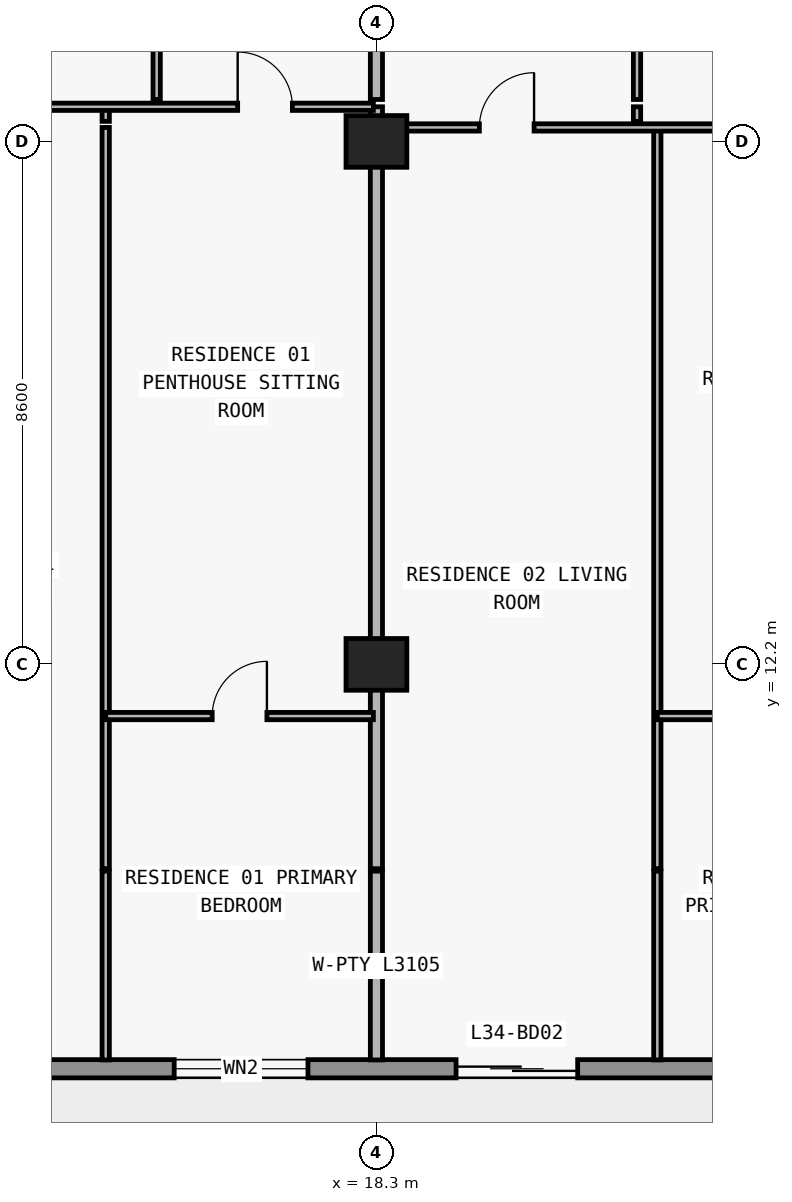
"""IFC4 building model, lengths in metres.
Left out: names, types, materials, properties, quantities, classifications, styles, units other than length and angle.
Written with IfcOpenShell. Run it as: python <this file> out.ifc"""

import sys

from ifc_helpers import new_model, si_unit, direction, frame, frame_2d, origin, origin_2d, place, context, subcontext, project, spatial, rectangle, extrude, element, fill, save


model = new_model("IFC4")
c1 = context("Model", 3, precision=1e-05, world=origin(), true_north=direction((0.0, 1.0)))
c2 = subcontext(c1, "Body", "Model", "MODEL_VIEW")
j1 = project(units=[si_unit("LENGTHUNIT", "METRE"), si_unit("PLANEANGLEUNIT", "RADIAN")], contexts=[c1])
p1 = place(None, origin())
s1 = spatial("IfcSite", under=j1, at=p1, CompositionType="ELEMENT")
p2 = place(p1, origin())
s2 = spatial("IfcBuilding", under=s1, at=p2, CompositionType="ELEMENT")
p3 = place(p2, frame((0.0, 0.0, 125.7)))
s3 = spatial("IfcBuildingStorey", under=s2, at=p3, CompositionType="ELEMENT", Elevation=125.7)
for number, where, z_axis, x_axis in (
    (1, (18.3, 12.2, 0.0), (0.0, 0.0, 1.0), (1.0, 0.0, 0.0)),
    (2, (18.3, 20.8, 0.0), (0.0, 0.0, 1.0), (1.0, 0.0, 0.0)),
):
    element("IfcColumn", number, at=place(p3, frame(where, z_axis=z_axis, x_axis=x_axis)), inside=s3, PredefinedType="COLUMN", context=c2, shape_type="SweptSolid", body=[
        extrude(rectangle(XDim=1.0, YDim=0.85, at=origin_2d()), origin(), (0.0, 0.0, 1.0), 3.05),
    ])
p4 = place(p3, frame((70.1, 5.55, 0.0), z_axis=(0.0, 0.0, 1.0), x_axis=(-1.0, 0.0, 0.0)))
e3 = element("IfcWall", 3, at=p4, inside=s3, PredefinedType="STANDARD", context=c2, shape_type="SweptSolid", body=[
    extrude(rectangle(XDim=62.4, YDim=0.3, at=frame_2d((31.2, 0.0))), origin(), (0.0, 0.0, 1.0), 3.05),
])
p5 = place(p4, frame((57.226, 0.0, 0.0)))
e4 = element("IfcOpeningElement", 4, at=p5, cuts=e3, PredefinedType="OPENING", context=c2, shape_type="SweptSolid", body=[
    extrude(rectangle(XDim=2.0, YDim=2.3, at=frame_2d((1.0, 1.15))), frame((0.0, 0.16, 0.0), z_axis=(0.0, -1.0, 0.0), x_axis=(1.0, 0.0, 0.0)), (0.0, 0.0, 1.0), 0.32),
])
p6 = place(p4, frame((52.926, 0.0, 0.85)))
e5 = element("IfcOpeningElement", 5, at=p6, cuts=e3, PredefinedType="OPENING", context=c2, shape_type="SweptSolid", body=[
    extrude(rectangle(XDim=2.2, YDim=1.55, at=frame_2d((1.1, 0.775))), frame((0.0, 0.16, 0.0), z_axis=(0.0, -1.0, 0.0), x_axis=(1.0, 0.0, 0.0)), (0.0, 0.0, 1.0), 0.32),
])
p7 = place(p4, frame((48.49, 0.0, 0.0)))
e6 = element("IfcOpeningElement", 6, at=p7, cuts=e3, PredefinedType="OPENING", context=c2, shape_type="SweptSolid", body=[
    extrude(rectangle(XDim=2.0, YDim=2.3, at=frame_2d((1.0, 1.15))), frame((0.0, 0.16, 0.0), z_axis=(0.0, -1.0, 0.0), x_axis=(1.0, 0.0, 0.0)), (0.0, 0.0, 1.0), 0.32),
])
p8 = place(p4, frame((44.39, 0.0, 0.85)))
e7 = element("IfcOpeningElement", 7, at=p8, cuts=e3, PredefinedType="OPENING", context=c2, shape_type="SweptSolid", body=[
    extrude(rectangle(XDim=1.8, YDim=1.55, at=frame_2d((0.9, 0.775))), frame((0.0, 0.16, 0.0), z_axis=(0.0, -1.0, 0.0), x_axis=(1.0, 0.0, 0.0)), (0.0, 0.0, 1.0), 0.32),
])
p9 = place(p4, frame((40.426, 0.0, 0.0)))
e8 = element("IfcOpeningElement", 8, at=p9, cuts=e3, PredefinedType="OPENING", context=c2, shape_type="SweptSolid", body=[
    extrude(rectangle(XDim=2.0, YDim=2.3, at=frame_2d((1.0, 1.15))), frame((0.0, 0.16, 0.0), z_axis=(0.0, -1.0, 0.0), x_axis=(1.0, 0.0, 0.0)), (0.0, 0.0, 1.0), 0.32),
])
p10 = place(p4, frame((36.126, 0.0, 0.85)))
e9 = element("IfcOpeningElement", 9, at=p10, cuts=e3, PredefinedType="OPENING", context=c2, shape_type="SweptSolid", body=[
    extrude(rectangle(XDim=2.2, YDim=1.55, at=frame_2d((1.1, 0.775))), frame((0.0, 0.16, 0.0), z_axis=(0.0, -1.0, 0.0), x_axis=(1.0, 0.0, 0.0)), (0.0, 0.0, 1.0), 0.32),
])
p11 = place(p4, frame((31.91, 0.0, 0.0)))
e10 = element("IfcOpeningElement", 10, at=p11, cuts=e3, PredefinedType="OPENING", context=c2, shape_type="SweptSolid", body=[
    extrude(rectangle(XDim=2.0, YDim=2.3, at=frame_2d((1.0, 1.15))), frame((0.0, 0.16, 0.0), z_axis=(0.0, -1.0, 0.0), x_axis=(1.0, 0.0, 0.0)), (0.0, 0.0, 1.0), 0.32),
])
p12 = place(p4, frame((28.21, 0.0, 0.85)))
e11 = element("IfcOpeningElement", 11, at=p12, cuts=e3, PredefinedType="OPENING", context=c2, shape_type="SweptSolid", body=[
    extrude(rectangle(XDim=1.8, YDim=1.55, at=frame_2d((0.9, 0.775))), frame((0.0, 0.16, 0.0), z_axis=(0.0, -1.0, 0.0), x_axis=(1.0, 0.0, 0.0)), (0.0, 0.0, 1.0), 0.32),
])
p13 = place(p4, frame((24.426, 0.0, 0.0)))
e12 = element("IfcOpeningElement", 12, at=p13, cuts=e3, PredefinedType="OPENING", context=c2, shape_type="SweptSolid", body=[
    extrude(rectangle(XDim=2.0, YDim=2.3, at=frame_2d((1.0, 1.15))), frame((0.0, 0.16, 0.0), z_axis=(0.0, -1.0, 0.0), x_axis=(1.0, 0.0, 0.0)), (0.0, 0.0, 1.0), 0.32),
])
p14 = place(p4, frame((20.126, 0.0, 0.85)))
e13 = element("IfcOpeningElement", 13, at=p14, cuts=e3, PredefinedType="OPENING", context=c2, shape_type="SweptSolid", body=[
    extrude(rectangle(XDim=2.2, YDim=1.55, at=frame_2d((1.1, 0.775))), frame((0.0, 0.16, 0.0), z_axis=(0.0, -1.0, 0.0), x_axis=(1.0, 0.0, 0.0)), (0.0, 0.0, 1.0), 0.32),
])
p15 = place(p4, frame((15.69, 0.0, 0.0)))
e14 = element("IfcOpeningElement", 14, at=p15, cuts=e3, PredefinedType="OPENING", context=c2, shape_type="SweptSolid", body=[
    extrude(rectangle(XDim=2.0, YDim=2.3, at=frame_2d((1.0, 1.15))), frame((0.0, 0.16, 0.0), z_axis=(0.0, -1.0, 0.0), x_axis=(1.0, 0.0, 0.0)), (0.0, 0.0, 1.0), 0.32),
])
p16 = place(p4, frame((11.59, 0.0, 0.85)))
e15 = element("IfcOpeningElement", 15, at=p16, cuts=e3, PredefinedType="OPENING", context=c2, shape_type="SweptSolid", body=[
    extrude(rectangle(XDim=1.8, YDim=1.55, at=frame_2d((0.9, 0.775))), frame((0.0, 0.16, 0.0), z_axis=(0.0, -1.0, 0.0), x_axis=(1.0, 0.0, 0.0)), (0.0, 0.0, 1.0), 0.32),
])
p17 = place(p4, frame((7.626, 0.0, 0.0)))
e16 = element("IfcOpeningElement", 16, at=p17, cuts=e3, PredefinedType="OPENING", context=c2, shape_type="SweptSolid", body=[
    extrude(rectangle(XDim=2.0, YDim=2.3, at=frame_2d((1.0, 1.15))), frame((0.0, 0.16, 0.0), z_axis=(0.0, -1.0, 0.0), x_axis=(1.0, 0.0, 0.0)), (0.0, 0.0, 1.0), 0.32),
])
p18 = place(p4, frame((3.326, 0.0, 0.85)))
e17 = element("IfcOpeningElement", 17, at=p18, cuts=e3, PredefinedType="OPENING", context=c2, shape_type="SweptSolid", body=[
    extrude(rectangle(XDim=2.2, YDim=1.55, at=frame_2d((1.1, 0.775))), frame((0.0, 0.16, 0.0), z_axis=(0.0, -1.0, 0.0), x_axis=(1.0, 0.0, 0.0)), (0.0, 0.0, 1.0), 0.32),
])
p19 = place(p3, frame((13.848, 5.695, 0.0), z_axis=(0.0, 0.0, 1.0), x_axis=(0.0, 1.0, 0.0)))
e18 = element("IfcWall", 18, at=p19, inside=s3, PredefinedType="PARTITIONING", context=c2, shape_type="SweptSolid", body=[
    extrude(rectangle(XDim=3.105, YDim=0.12, at=frame_2d((1.552, 0.0))), origin(), (0.0, 0.0, 1.0), 3.05),
])
p20 = place(p3, frame((13.848, 8.84, 0.0), z_axis=(0.0, 0.0, 1.0), x_axis=(0.0, 1.0, 0.0)))
e19 = element("IfcWall", 19, at=p20, inside=s3, PredefinedType="PARTITIONING", context=c2, shape_type="SweptSolid", body=[
    extrude(rectangle(XDim=12.19, YDim=0.12, at=frame_2d((6.095, 0.0))), origin(), (0.0, 0.0, 1.0), 3.05),
])
p21 = place(p3, frame((13.848, 21.13, 0.0), z_axis=(0.0, 0.0, 1.0), x_axis=(0.0, 1.0, 0.0)))
e20 = element("IfcWall", 20, at=p21, inside=s3, PredefinedType="PARTITIONING", context=c2, shape_type="SweptSolid", body=[
    extrude(rectangle(XDim=0.24, YDim=0.12, at=frame_2d((0.12, 0.0))), origin(), (0.0, 0.0, 1.0), 3.05),
])
p22 = place(p3, frame((14.686, 21.49, 0.0), z_axis=(0.0, 0.0, 1.0), x_axis=(0.0, 1.0, 0.0)))
e21 = element("IfcWall", 21, at=p22, inside=s3, PredefinedType="PARTITIONING", context=c2, shape_type="SweptSolid", body=[
    extrude(rectangle(XDim=4.69, YDim=0.12, at=frame_2d((2.345, 0.0))), origin(), (0.0, 0.0, 1.0), 3.05),
])
p23 = place(p22, frame((1.895, 0.0, 0.0)))
e22 = element("IfcOpeningElement", 22, at=p23, cuts=e21, PredefinedType="OPENING", context=c2, shape_type="SweptSolid", body=[
    extrude(rectangle(XDim=0.9, YDim=2.15, at=frame_2d((0.45, 1.075))), frame((0.0, 0.07, 0.0), z_axis=(0.0, -1.0, 0.0), x_axis=(1.0, 0.0, 0.0)), (0.0, 0.0, 1.0), 0.14),
])
p24 = place(p3, frame((18.3, 5.695, 0.0), z_axis=(0.0, 0.0, 1.0), x_axis=(0.0, 1.0, 0.0)))
e23 = element("IfcWall", 23, at=p24, inside=s3, PredefinedType="PARTITIONING", context=c2, shape_type="SweptSolid", body=[
    extrude(rectangle(XDim=3.105, YDim=0.2, at=frame_2d((1.552, 0.0))), origin(), (0.0, 0.0, 1.0), 3.05),
])
p25 = place(p3, frame((18.3, 8.84, 0.0), z_axis=(0.0, 0.0, 1.0), x_axis=(0.0, 1.0, 0.0)))
e24 = element("IfcWall", 24, at=p25, inside=s3, PredefinedType="PARTITIONING", context=c2, shape_type="SweptSolid", body=[
    extrude(rectangle(XDim=12.19, YDim=0.2, at=frame_2d((6.095, 0.0))), origin(), (0.0, 0.0, 1.0), 2.174),
])
p26 = place(p3, frame((18.3, 21.13, 0.0), z_axis=(0.0, 0.0, 1.0), x_axis=(0.0, 1.0, 0.0)))
e25 = element("IfcWall", 25, at=p26, inside=s3, PredefinedType="PARTITIONING", context=c2, shape_type="SweptSolid", body=[
    extrude(rectangle(XDim=0.24, YDim=0.2, at=frame_2d((0.12, 0.0))), origin(), (0.0, 0.0, 1.0), 2.174),
])
p27 = place(p3, frame((18.3, 21.49, 0.0), z_axis=(0.0, 0.0, 1.0), x_axis=(0.0, 1.0, 0.0)))
e26 = element("IfcWall", 26, at=p27, inside=s3, PredefinedType="PARTITIONING", context=c2, shape_type="SweptSolid", body=[
    extrude(rectangle(XDim=4.69, YDim=0.2, at=frame_2d((2.345, 0.0))), origin(), (0.0, 0.0, 1.0), 2.174),
])
p28 = place(p3, frame((22.586, 21.13, 0.0), z_axis=(0.0, 0.0, 1.0), x_axis=(0.0, 1.0, 0.0)))
e27 = element("IfcWall", 27, at=p28, inside=s3, PredefinedType="PARTITIONING", context=c2, shape_type="SweptSolid", body=[
    extrude(rectangle(XDim=0.24, YDim=0.12, at=frame_2d((0.12, 0.0))), origin(), (0.0, 0.0, 1.0), 3.05),
])
p29 = place(p3, frame((22.586, 21.49, 0.0), z_axis=(0.0, 0.0, 1.0), x_axis=(0.0, 1.0, 0.0)))
e28 = element("IfcWall", 28, at=p29, inside=s3, PredefinedType="PARTITIONING", context=c2, shape_type="SweptSolid", body=[
    extrude(rectangle(XDim=4.69, YDim=0.12, at=frame_2d((2.345, 0.0))), origin(), (0.0, 0.0, 1.0), 3.05),
])
p30 = place(p29, frame((1.895, 0.0, 0.0)))
e29 = element("IfcOpeningElement", 29, at=p30, cuts=e28, PredefinedType="OPENING", context=c2, shape_type="SweptSolid", body=[
    extrude(rectangle(XDim=0.9, YDim=2.15, at=frame_2d((0.45, 1.075))), frame((0.0, 0.07, 0.0), z_axis=(0.0, -1.0, 0.0), x_axis=(1.0, 0.0, 0.0)), (0.0, 0.0, 1.0), 0.14),
])
p31 = place(p3, frame((22.92, 5.695, 0.0), z_axis=(0.0, 0.0, 1.0), x_axis=(0.0, 1.0, 0.0)))
e30 = element("IfcWall", 30, at=p31, inside=s3, PredefinedType="PARTITIONING", context=c2, shape_type="SweptSolid", body=[
    extrude(rectangle(XDim=3.105, YDim=0.12, at=frame_2d((1.552, 0.0))), origin(), (0.0, 0.0, 1.0), 3.05),
])
p32 = place(p3, frame((22.92, 8.84, 0.0), z_axis=(0.0, 0.0, 1.0), x_axis=(0.0, 1.0, 0.0)))
e31 = element("IfcWall", 31, at=p32, inside=s3, PredefinedType="PARTITIONING", context=c2, shape_type="SweptSolid", body=[
    extrude(rectangle(XDim=12.19, YDim=0.12, at=frame_2d((6.095, 0.0))), origin(), (0.0, 0.0, 1.0), 3.05),
])
p33 = place(p3, frame((13.848, 11.35, 0.0), z_axis=(0.0, 0.0, 1.0), x_axis=(1.0, 0.0, 0.0)))
e32 = element("IfcWall", 32, at=p33, inside=s3, PredefinedType="PARTITIONING", context=c2, shape_type="SweptSolid", body=[
    extrude(rectangle(XDim=4.402, YDim=0.12, at=frame_2d((2.201, 0.0))), origin(), (0.0, 0.0, 1.0), 3.05),
])
p34 = place(p33, frame((1.751, 0.0, 0.0)))
e33 = element("IfcOpeningElement", 33, at=p34, cuts=e32, PredefinedType="OPENING", context=c2, shape_type="SweptSolid", body=[
    extrude(rectangle(XDim=0.9, YDim=2.15, at=frame_2d((0.45, 1.075))), frame((0.0, 0.07, 0.0), z_axis=(0.0, -1.0, 0.0), x_axis=(1.0, 0.0, 0.0)), (0.0, 0.0, 1.0), 0.14),
])
p35 = place(p3, frame((22.92, 11.35, 0.0), z_axis=(0.0, 0.0, 1.0), x_axis=(1.0, 0.0, 0.0)))
e34 = element("IfcWall", 34, at=p35, inside=s3, PredefinedType="PARTITIONING", context=c2, shape_type="SweptSolid", body=[
    extrude(rectangle(XDim=3.73, YDim=0.12, at=frame_2d((1.865, 0.0))), origin(), (0.0, 0.0, 1.0), 3.05),
])
p36 = place(p35, frame((1.415, 0.0, 0.0)))
e35 = element("IfcOpeningElement", 35, at=p36, cuts=e34, PredefinedType="OPENING", context=c2, shape_type="SweptSolid", body=[
    extrude(rectangle(XDim=0.9, YDim=2.15, at=frame_2d((0.45, 1.075))), frame((0.0, 0.07, 0.0), z_axis=(0.0, -1.0, 0.0), x_axis=(1.0, 0.0, 0.0)), (0.0, 0.0, 1.0), 0.14),
])
p37 = place(p3, frame((18.3, 21.03, 0.0), z_axis=(0.0, 0.0, 1.0), x_axis=(1.0, 0.0, 0.0)))
e36 = element("IfcWall", 36, at=p37, inside=s3, PredefinedType="PARTITIONING", context=c2, shape_type="SweptSolid", body=[
    extrude(rectangle(XDim=8.18, YDim=0.12, at=frame_2d((4.09, 0.0))), origin(), (0.0, 0.0, 1.0), 2.174),
])
p38 = place(p37, frame((1.693, 0.0, 0.0)))
e37 = element("IfcOpeningElement", 37, at=p38, cuts=e36, PredefinedType="OPENING", context=c2, shape_type="SweptSolid", body=[
    extrude(rectangle(XDim=0.9, YDim=2.124, at=frame_2d((0.45, 1.062))), frame((0.0, 0.07, 0.0), z_axis=(0.0, -1.0, 0.0), x_axis=(1.0, 0.0, 0.0)), (0.0, 0.0, 1.0), 0.14),
])
p39 = place(p37, frame((5.95, 0.0, 0.0)))
e38 = element("IfcOpeningElement", 38, at=p39, cuts=e36, PredefinedType="OPENING", context=c2, shape_type="SweptSolid", body=[
    extrude(rectangle(XDim=0.9, YDim=2.124, at=frame_2d((0.45, 1.062))), frame((0.0, 0.07, 0.0), z_axis=(0.0, -1.0, 0.0), x_axis=(1.0, 0.0, 0.0)), (0.0, 0.0, 1.0), 0.14),
])
p40 = place(p3, frame((9.9, 21.37, 0.0), z_axis=(0.0, 0.0, 1.0), x_axis=(1.0, 0.0, 0.0)))
e39 = element("IfcWall", 39, at=p40, inside=s3, PredefinedType="PARTITIONING", context=c2, shape_type="SweptSolid", body=[
    extrude(rectangle(XDim=8.35, YDim=0.12, at=frame_2d((4.175, 0.0))), origin(), (0.0, 0.0, 1.0), 3.05),
])
p41 = place(p40, frame((1.524, 0.0, 0.0)))
e40 = element("IfcOpeningElement", 40, at=p41, cuts=e39, PredefinedType="OPENING", context=c2, shape_type="SweptSolid", body=[
    extrude(rectangle(XDim=0.9, YDim=2.15, at=frame_2d((0.45, 1.075))), frame((0.0, 0.07, 0.0), z_axis=(0.0, -1.0, 0.0), x_axis=(1.0, 0.0, 0.0)), (0.0, 0.0, 1.0), 0.14),
])
p42 = place(p40, frame((6.118, 0.0, 0.0)))
e41 = element("IfcOpeningElement", 41, at=p42, cuts=e39, PredefinedType="OPENING", context=c2, shape_type="SweptSolid", body=[
    extrude(rectangle(XDim=0.9, YDim=2.15, at=frame_2d((0.45, 1.075))), frame((0.0, 0.07, 0.0), z_axis=(0.0, -1.0, 0.0), x_axis=(1.0, 0.0, 0.0)), (0.0, 0.0, 1.0), 0.14),
])
p43 = place(p6, origin())
e42 = element("IfcWindow", 42, at=p43, inside=s3, PartitioningType="SINGLE_PANEL", PredefinedType="WINDOW", context=c2, shape_type="SweptSolid", body=[
    extrude(rectangle(XDim=2.2, YDim=1.55, at=frame_2d((1.1, 0.775))), frame((0.0, 0.03, 0.0), z_axis=(0.0, -1.0, 0.0), x_axis=(1.0, 0.0, 0.0)), (0.0, 0.0, 1.0), 0.06),
])
fill(e5, e42)
p44 = place(p7, origin())
e43 = element("IfcDoor", 43, at=p44, inside=s3, OperationType="DOUBLE_DOOR_SLIDING", PredefinedType="DOOR", context=c2, shape_type="SweptSolid", body=[
    extrude(rectangle(XDim=2.0, YDim=2.3, at=frame_2d((1.0, 1.15))), frame((0.0, 0.025, 0.0), z_axis=(0.0, -1.0, 0.0), x_axis=(1.0, 0.0, 0.0)), (0.0, 0.0, 1.0), 0.05),
])
fill(e6, e43)
p45 = place(p42, origin())
e44 = element("IfcDoor", 44, at=p45, inside=s3, OperationType="SINGLE_SWING_LEFT", PredefinedType="DOOR", context=c2, shape_type="SweptSolid", body=[
    extrude(rectangle(XDim=0.9, YDim=2.15, at=frame_2d((0.45, 1.075))), frame((0.0, 0.025, 0.0), z_axis=(0.0, -1.0, 0.0), x_axis=(1.0, 0.0, 0.0)), (0.0, 0.0, 1.0), 0.05),
])
fill(e41, e44)
p46 = place(p34, origin())
e45 = element("IfcDoor", 45, at=p46, inside=s3, OperationType="SINGLE_SWING_RIGHT", PredefinedType="DOOR", context=c2, shape_type="SweptSolid", body=[
    extrude(rectangle(XDim=0.9, YDim=2.15, at=frame_2d((0.45, 1.075))), frame((0.0, 0.025, 0.0), z_axis=(0.0, -1.0, 0.0), x_axis=(1.0, 0.0, 0.0)), (0.0, 0.0, 1.0), 0.05),
])
fill(e33, e45)
p47 = place(p38, origin())
e46 = element("IfcDoor", 46, at=p47, inside=s3, OperationType="SINGLE_SWING_RIGHT", PredefinedType="DOOR", context=c2, shape_type="SweptSolid", body=[
    extrude(rectangle(XDim=0.9, YDim=2.124, at=frame_2d((0.45, 1.062))), frame((0.0, 0.025, 0.0), z_axis=(0.0, -1.0, 0.0), x_axis=(1.0, 0.0, 0.0)), (0.0, 0.0, 1.0), 0.05),
])
fill(e37, e46)
save(model, sys.argv[1])
